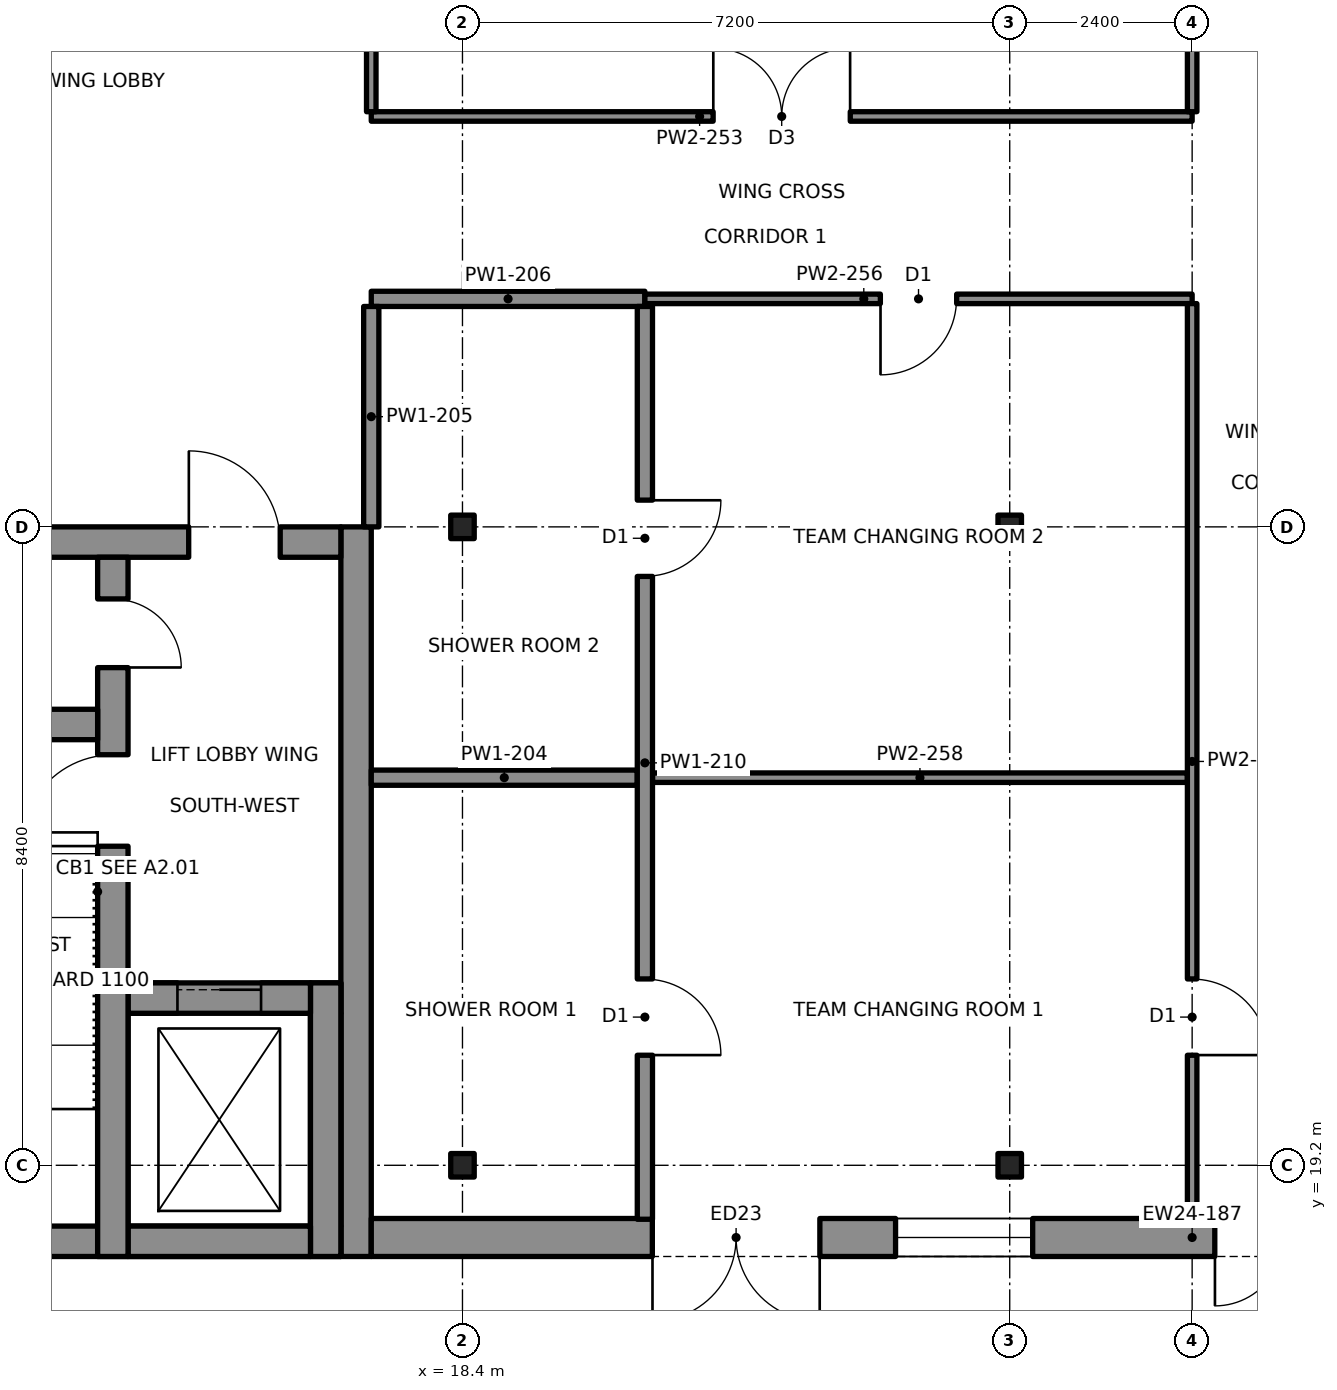
"""IFC4 building model, lengths in metres.
Left out: names, types, materials, properties, quantities, classifications, styles, units other than length and angle.
Written with IfcOpenShell. Run it as: python <this file> out.ifc"""

import sys

from ifc_helpers import new_model, si_unit, direction, frame, frame_2d, origin, origin_2d, place, context, subcontext, project, spatial, rectangle, i_section, extrude, element, fill, save


model = new_model("IFC4")
c1 = context("Model", 3, precision=1e-05, world=origin(), true_north=direction((0.0, 1.0)))
c2 = subcontext(c1, "Body", "Model", "MODEL_VIEW")
j1 = project(units=[si_unit("LENGTHUNIT", "METRE"), si_unit("PLANEANGLEUNIT", "RADIAN")], contexts=[c1])
p1 = place(None, origin())
s1 = spatial("IfcSite", under=j1, at=p1, CompositionType="ELEMENT")
p2 = place(p1, origin())
s2 = spatial("IfcBuilding", under=s1, at=p2, CompositionType="ELEMENT")
p3 = place(p2, origin())
s3 = spatial("IfcBuildingStorey", under=s2, at=p3, CompositionType="ELEMENT", Elevation=0.0)
for number, where, z_axis, x_axis in (
    (1, (18.4, 19.2, -0.9), (0.0, 0.0, 1.0), (1.0, 0.0, 0.0)),
    (2, (18.4, 27.6, -0.9), (0.0, 0.0, 1.0), (1.0, 0.0, 0.0)),
    (3, (25.6, 19.2, -0.9), (0.0, 0.0, 1.0), (1.0, 0.0, 0.0)),
    (4, (25.6, 27.6, -0.9), (0.0, 0.0, 1.0), (1.0, 0.0, 0.0)),
):
    element("IfcColumn", number, at=place(p3, frame(where, z_axis=z_axis, x_axis=x_axis)), inside=s3, PredefinedType="COLUMN", context=c2, shape_type="SweptSolid", body=[
        extrude(i_section(OverallWidth=0.309, OverallDepth=0.323, WebThickness=0.014, FlangeThickness=0.023, at=origin_2d()), origin(), (0.0, 0.0, 1.0), 5.3),
    ])
p4 = place(p3, frame((17.2, 18.25, 0.0), z_axis=(0.0, 0.0, 1.0), x_axis=(1.0, 0.0, 0.0)))
e5 = element("IfcWall", 5, at=p4, inside=s3, PredefinedType="SOLIDWALL", context=c2, shape_type="SweptSolid", body=[
    extrude(rectangle(XDim=21.6, YDim=0.5, at=frame_2d((10.8, 0.0))), origin(), (0.0, 0.0, 1.0), 4.4),
])
p5 = place(p4, frame((6.9, 0.0, 0.9)))
e6 = element("IfcOpeningElement", 6, at=p5, cuts=e5, PredefinedType="OPENING", context=c2, shape_type="SweptSolid", body=[
    extrude(rectangle(XDim=1.8, YDim=2.0, at=frame_2d((0.9, 1.0))), frame((0.0, 0.26, 0.0), z_axis=(0.0, -1.0, 0.0), x_axis=(1.0, 0.0, 0.0)), (0.0, 0.0, 1.0), 0.52),
])
p6 = place(p4, frame((15.1, 0.0, 0.9)))
e7 = element("IfcOpeningElement", 7, at=p6, cuts=e5, PredefinedType="OPENING", context=c2, shape_type="SweptSolid", body=[
    extrude(rectangle(XDim=1.8, YDim=2.0, at=frame_2d((0.9, 1.0))), frame((0.0, 0.26, 0.0), z_axis=(0.0, -1.0, 0.0), x_axis=(1.0, 0.0, 0.0)), (0.0, 0.0, 1.0), 0.52),
])
p7 = place(p4, frame((19.3, 0.0, 0.9)))
e8 = element("IfcOpeningElement", 8, at=p7, cuts=e5, PredefinedType="OPENING", context=c2, shape_type="SweptSolid", body=[
    extrude(rectangle(XDim=1.8, YDim=2.0, at=frame_2d((0.9, 1.0))), frame((0.0, 0.26, 0.0), z_axis=(0.0, -1.0, 0.0), x_axis=(1.0, 0.0, 0.0)), (0.0, 0.0, 1.0), 0.52),
])
p8 = place(p4, frame((3.7, 0.0, 0.0)))
e9 = element("IfcOpeningElement", 9, at=p8, cuts=e5, PredefinedType="OPENING", context=c2, shape_type="SweptSolid", body=[
    extrude(rectangle(XDim=2.2, YDim=2.4, at=frame_2d((1.1, 1.2))), frame((0.0, 0.26, 0.0), z_axis=(0.0, -1.0, 0.0), x_axis=(1.0, 0.0, 0.0)), (0.0, 0.0, 1.0), 0.52),
])
p9 = place(p4, frame((11.1, 0.0, 0.0)))
e10 = element("IfcOpeningElement", 10, at=p9, cuts=e5, PredefinedType="OPENING", context=c2, shape_type="SweptSolid", body=[
    extrude(rectangle(XDim=1.8, YDim=2.4, at=frame_2d((0.9, 1.2))), frame((0.0, 0.26, 0.0), z_axis=(0.0, -1.0, 0.0), x_axis=(1.0, 0.0, 0.0)), (0.0, 0.0, 1.0), 0.52),
])
p10 = place(p3, frame((17.0, 18.0, 0.0), z_axis=(0.0, 0.0, 1.0), x_axis=(0.0, 1.0, 0.0)))
e11 = element("IfcWall", 11, at=p10, inside=s3, PredefinedType="SHEAR", context=c2, shape_type="SweptSolid", body=[
    extrude(rectangle(XDim=9.6, YDim=0.4, at=frame_2d((4.8, 0.0))), origin(), (0.0, 0.0, 1.0), 4.4),
])
p11 = place(p3, frame((10.4, 18.2, 0.0), z_axis=(0.0, 0.0, 1.0), x_axis=(1.0, 0.0, 0.0)))
e12 = element("IfcWall", 12, at=p11, inside=s3, PredefinedType="SHEAR", context=c2, shape_type="SweptSolid", body=[
    extrude(rectangle(XDim=6.4, YDim=0.4, at=frame_2d((3.2, 0.0))), origin(), (0.0, 0.0, 1.0), 4.4),
])
p12 = place(p3, frame((10.4, 27.4, 0.0), z_axis=(0.0, 0.0, 1.0), x_axis=(1.0, 0.0, 0.0)))
e13 = element("IfcWall", 13, at=p12, inside=s3, PredefinedType="SHEAR", context=c2, shape_type="SweptSolid", body=[
    extrude(rectangle(XDim=6.4, YDim=0.4, at=frame_2d((3.2, 0.0))), origin(), (0.0, 0.0, 1.0), 4.4),
])
p13 = place(p12, frame((4.4, 0.0, 0.0)))
e14 = element("IfcOpeningElement", 14, at=p13, cuts=e13, PredefinedType="OPENING", context=c2, shape_type="SweptSolid", body=[
    extrude(rectangle(XDim=1.2, YDim=2.1, at=frame_2d((0.6, 1.05))), frame((0.0, 0.21, 0.0), z_axis=(0.0, -1.0, 0.0), x_axis=(1.0, 0.0, 0.0)), (0.0, 0.0, 1.0), 0.42),
])
p14 = place(p3, frame((13.8, 18.4, 0.0), z_axis=(0.0, 0.0, 1.0), x_axis=(0.0, 1.0, 0.0)))
e15 = element("IfcWall", 15, at=p14, inside=s3, PredefinedType="SHEAR", context=c2, shape_type="SweptSolid", body=[
    extrude(rectangle(XDim=8.8, YDim=0.4, at=frame_2d((4.4, 0.0))), origin(), (0.0, 0.0, 1.0), 4.4),
])
p15 = place(p14, frame((5.0, 0.0, 0.0)))
e16 = element("IfcOpeningElement", 16, at=p15, cuts=e15, PredefinedType="OPENING", context=c2, shape_type="SweptSolid", body=[
    extrude(rectangle(XDim=1.2, YDim=2.1, at=frame_2d((0.6, 1.05))), frame((0.0, 0.21, 0.0), z_axis=(0.0, -1.0, 0.0), x_axis=(1.0, 0.0, 0.0)), (0.0, 0.0, 1.0), 0.42),
])
p16 = place(p14, frame((7.35, 0.0, 0.0)))
e17 = element("IfcOpeningElement", 17, at=p16, cuts=e15, PredefinedType="OPENING", context=c2, shape_type="SweptSolid", body=[
    extrude(rectangle(XDim=0.9, YDim=2.1, at=frame_2d((0.45, 1.05))), frame((0.0, 0.21, 0.0), z_axis=(0.0, -1.0, 0.0), x_axis=(1.0, 0.0, 0.0)), (0.0, 0.0, 1.0), 0.42),
])
p17 = place(p3, frame((10.4, 25.0, 0.0), z_axis=(0.0, 0.0, 1.0), x_axis=(1.0, 0.0, 0.0)))
e18 = element("IfcWall", 18, at=p17, inside=s3, PredefinedType="SHEAR", context=c2, shape_type="SweptSolid", body=[
    extrude(rectangle(XDim=3.2, YDim=0.4, at=frame_2d((1.6, 0.0))), origin(), (0.0, 0.0, 1.0), 4.4),
])
p18 = place(p3, frame((14.0, 21.4, 0.0), z_axis=(0.0, 0.0, 1.0), x_axis=(1.0, 0.0, 0.0)))
e19 = element("IfcWall", 19, at=p18, inside=s3, PredefinedType="SHEAR", context=c2, shape_type="SweptSolid", body=[
    extrude(rectangle(XDim=2.8, YDim=0.4, at=frame_2d((1.4, 0.0))), origin(), (0.0, 0.0, 1.0), 4.4),
])
p19 = place(p18, frame((0.65, 0.0, 0.0)))
e20 = element("IfcOpeningElement", 20, at=p19, cuts=e19, PredefinedType="OPENING", context=c2, shape_type="SweptSolid", body=[
    extrude(rectangle(XDim=1.1, YDim=2.1, at=frame_2d((0.55, 1.05))), frame((0.0, 0.21, 0.0), z_axis=(0.0, -1.0, 0.0), x_axis=(1.0, 0.0, 0.0)), (0.0, 0.0, 1.0), 0.42),
])
p20 = place(p3, frame((16.6, 18.4, 0.0), z_axis=(0.0, 0.0, 1.0), x_axis=(0.0, 1.0, 0.0)))
e21 = element("IfcWall", 21, at=p20, inside=s3, PredefinedType="SHEAR", context=c2, shape_type="SweptSolid", body=[
    extrude(rectangle(XDim=2.8, YDim=0.4, at=frame_2d((1.4, 0.0))), origin(), (0.0, 0.0, 1.0), 4.4),
])
for number, where, z_axis, x_axis in (
    (22, (13.8, 18.0, -1.5), (0.0, 0.0, 1.0), (0.0, 1.0, 0.0)),
    (23, (16.6, 18.0, -1.5), (0.0, 0.0, 1.0), (0.0, 1.0, 0.0)),
):
    element("IfcWall", number, at=place(p3, frame(where, z_axis=z_axis, x_axis=x_axis)), inside=s3, PredefinedType="SHEAR", context=c2, shape_type="SweptSolid", body=[
        extrude(rectangle(XDim=3.6, YDim=0.4, at=frame_2d((1.8, 0.0))), origin(), (0.0, 0.0, 1.0), 1.5),
    ])
for number, where, z_axis, x_axis in (
    (24, (14.0, 18.2, -1.5), (0.0, 0.0, 1.0), (1.0, 0.0, 0.0)),
    (25, (14.0, 21.4, -1.5), (0.0, 0.0, 1.0), (1.0, 0.0, 0.0)),
):
    element("IfcWall", number, at=place(p3, frame(where, z_axis=z_axis, x_axis=x_axis)), inside=s3, PredefinedType="SHEAR", context=c2, shape_type="SweptSolid", body=[
        extrude(rectangle(XDim=2.4, YDim=0.4, at=frame_2d((1.2, 0.0))), origin(), (0.0, 0.0, 1.0), 1.5),
    ])
p21 = place(p3, frame((17.2, 24.3, 0.0), z_axis=(0.0, 0.0, 1.0), x_axis=(1.0, 0.0, 0.0)))
e26 = element("IfcWall", 26, at=p21, inside=s3, PredefinedType="PARTITIONING", context=c2, shape_type="SweptSolid", body=[
    extrude(rectangle(XDim=3.5, YDim=0.2, at=frame_2d((1.75, 0.0))), origin(), (0.0, 0.0, 1.0), 3.65),
])
p22 = place(p3, frame((20.9, 24.3, 0.0), z_axis=(0.0, 0.0, 1.0), x_axis=(1.0, 0.0, 0.0)))
e27 = element("IfcWall", 27, at=p22, inside=s3, PredefinedType="PARTITIONING", context=c2, shape_type="SweptSolid", body=[
    extrude(rectangle(XDim=7.038, YDim=0.125, at=frame_2d((3.519, 0.0))), origin(), (0.0, 0.0, 1.0), 3.65),
])
p23 = place(p3, frame((17.2, 30.6, 0.0), z_axis=(0.0, 0.0, 1.0), x_axis=(1.0, 0.0, 0.0)))
e28 = element("IfcWall", 28, at=p23, inside=s3, PredefinedType="PARTITIONING", context=c2, shape_type="SweptSolid", body=[
    extrude(rectangle(XDim=3.6, YDim=0.2, at=frame_2d((1.8, 0.0))), origin(), (0.0, 0.0, 1.0), 3.65),
])
p24 = place(p3, frame((20.8, 30.6, 0.0), z_axis=(0.0, 0.0, 1.0), x_axis=(1.0, 0.0, 0.0)))
e29 = element("IfcWall", 29, at=p24, inside=s3, PredefinedType="PARTITIONING", context=c2, shape_type="SweptSolid", body=[
    extrude(rectangle(XDim=7.2, YDim=0.125, at=frame_2d((3.6, 0.0))), origin(), (0.0, 0.0, 1.0), 3.65),
])
p25 = place(p24, frame((3.1, 0.0, 0.0)))
e30 = element("IfcOpeningElement", 30, at=p25, cuts=e29, PredefinedType="OPENING", context=c2, shape_type="SweptSolid", body=[
    extrude(rectangle(XDim=1.0, YDim=2.1, at=frame_2d((0.5, 1.05))), frame((0.0, 0.073, 0.0), z_axis=(0.0, -1.0, 0.0), x_axis=(1.0, 0.0, 0.0)), (0.0, 0.0, 1.0), 0.145),
])
p26 = place(p3, frame((17.2, 33.0, 0.0), z_axis=(0.0, 0.0, 1.0), x_axis=(1.0, 0.0, 0.0)))
e31 = element("IfcWall", 31, at=p26, inside=s3, PredefinedType="PARTITIONING", context=c2, shape_type="SweptSolid", body=[
    extrude(rectangle(XDim=10.8, YDim=0.125, at=frame_2d((5.4, 0.0))), origin(), (0.0, 0.0, 1.0), 3.65),
])
p27 = place(p26, frame((4.5, 0.0, 0.0)))
e32 = element("IfcOpeningElement", 32, at=p27, cuts=e31, PredefinedType="OPENING", context=c2, shape_type="SweptSolid", body=[
    extrude(rectangle(XDim=1.8, YDim=2.1, at=frame_2d((0.9, 1.05))), frame((0.0, 0.073, 0.0), z_axis=(0.0, -1.0, 0.0), x_axis=(1.0, 0.0, 0.0)), (0.0, 0.0, 1.0), 0.145),
])
p28 = place(p3, frame((17.2, 27.6, 0.0), z_axis=(0.0, 0.0, 1.0), x_axis=(0.0, 1.0, 0.0)))
e33 = element("IfcWall", 33, at=p28, inside=s3, PredefinedType="PARTITIONING", context=c2, shape_type="SweptSolid", body=[
    extrude(rectangle(XDim=2.9, YDim=0.2, at=frame_2d((1.45, 0.0))), origin(), (0.0, 0.0, 1.0), 3.65),
])
p29 = place(p3, frame((17.2, 33.062, 0.0), z_axis=(0.0, 0.0, 1.0), x_axis=(0.0, 1.0, 0.0)))
e34 = element("IfcWall", 34, at=p29, inside=s3, PredefinedType="PARTITIONING", context=c2, shape_type="SweptSolid", body=[
    extrude(rectangle(XDim=5.875, YDim=0.125, at=frame_2d((2.938, 0.0))), origin(), (0.0, 0.0, 1.0), 3.65),
])
p30 = place(p3, frame((20.8, 18.49, 0.0), z_axis=(0.0, 0.0, 1.0), x_axis=(0.0, 1.0, 0.0)))
e35 = element("IfcWall", 35, at=p30, inside=s3, PredefinedType="PARTITIONING", context=c2, shape_type="SweptSolid", body=[
    extrude(rectangle(XDim=12.01, YDim=0.2, at=frame_2d((6.005, 0.0))), origin(), (0.0, 0.0, 1.0), 3.65),
])
p31 = place(p30, frame((2.16, 0.0, 0.0)))
e36 = element("IfcOpeningElement", 36, at=p31, cuts=e35, PredefinedType="OPENING", context=c2, shape_type="SweptSolid", body=[
    extrude(rectangle(XDim=1.0, YDim=2.1, at=frame_2d((0.5, 1.05))), frame((0.0, 0.11, 0.0), z_axis=(0.0, -1.0, 0.0), x_axis=(1.0, 0.0, 0.0)), (0.0, 0.0, 1.0), 0.22),
])
p32 = place(p30, frame((8.46, 0.0, 0.0)))
e37 = element("IfcOpeningElement", 37, at=p32, cuts=e35, PredefinedType="OPENING", context=c2, shape_type="SweptSolid", body=[
    extrude(rectangle(XDim=1.0, YDim=2.1, at=frame_2d((0.5, 1.05))), frame((0.0, 0.11, 0.0), z_axis=(0.0, -1.0, 0.0), x_axis=(1.0, 0.0, 0.0)), (0.0, 0.0, 1.0), 0.22),
])
p33 = place(p3, frame((28.0, 18.49, 0.0), z_axis=(0.0, 0.0, 1.0), x_axis=(0.0, 1.0, 0.0)))
e38 = element("IfcWall", 38, at=p33, inside=s3, PredefinedType="PARTITIONING", context=c2, shape_type="SweptSolid", body=[
    extrude(rectangle(XDim=12.048, YDim=0.125, at=frame_2d((6.024, 0.0))), origin(), (0.0, 0.0, 1.0), 3.65),
])
p34 = place(p33, frame((2.16, 0.0, 0.0)))
e39 = element("IfcOpeningElement", 39, at=p34, cuts=e38, PredefinedType="OPENING", context=c2, shape_type="SweptSolid", body=[
    extrude(rectangle(XDim=1.0, YDim=2.1, at=frame_2d((0.5, 1.05))), frame((0.0, 0.073, 0.0), z_axis=(0.0, -1.0, 0.0), x_axis=(1.0, 0.0, 0.0)), (0.0, 0.0, 1.0), 0.145),
])
p35 = place(p3, frame((28.0, 33.062, 0.0), z_axis=(0.0, 0.0, 1.0), x_axis=(0.0, 1.0, 0.0)))
e40 = element("IfcWall", 40, at=p35, inside=s3, PredefinedType="PARTITIONING", context=c2, shape_type="SweptSolid", body=[
    extrude(rectangle(XDim=5.875, YDim=0.125, at=frame_2d((2.938, 0.0))), origin(), (0.0, 0.0, 1.0), 3.65),
])
p36 = place(p5, origin())
e41 = element("IfcWindow", 41, at=p36, inside=s3, PartitioningType="SINGLE_PANEL", PredefinedType="WINDOW", context=c2, shape_type="SweptSolid", body=[
    extrude(rectangle(XDim=1.8, YDim=2.0, at=frame_2d((0.9, 1.0))), frame((0.0, 0.03, 0.0), z_axis=(0.0, -1.0, 0.0), x_axis=(1.0, 0.0, 0.0)), (0.0, 0.0, 1.0), 0.06),
])
fill(e6, e41)
p37 = place(p8, origin())
e42 = element("IfcDoor", 42, at=p37, inside=s3, OperationType="DOUBLE_DOOR_SINGLE_SWING", PredefinedType="DOOR", context=c2, shape_type="SweptSolid", body=[
    extrude(rectangle(XDim=2.2, YDim=2.4, at=frame_2d((1.1, 1.2))), frame((0.0, 0.025, 0.0), z_axis=(0.0, -1.0, 0.0), x_axis=(1.0, 0.0, 0.0)), (0.0, 0.0, 1.0), 0.05),
])
fill(e9, e42)
p38 = place(p9, origin())
e43 = element("IfcDoor", 43, at=p38, inside=s3, OperationType="DOUBLE_DOOR_SINGLE_SWING", PredefinedType="DOOR", context=c2, shape_type="SweptSolid", body=[
    extrude(rectangle(XDim=1.8, YDim=2.4, at=frame_2d((0.9, 1.2))), frame((0.0, 0.025, 0.0), z_axis=(0.0, -1.0, 0.0), x_axis=(1.0, 0.0, 0.0)), (0.0, 0.0, 1.0), 0.05),
])
fill(e10, e43)
p39 = place(p13, origin())
e44 = element("IfcDoor", 44, at=p39, inside=s3, OperationType="SINGLE_SWING_LEFT", PredefinedType="DOOR", context=c2, shape_type="SweptSolid", body=[
    extrude(rectangle(XDim=1.2, YDim=2.1, at=frame_2d((0.6, 1.05))), frame((0.0, 0.025, 0.0), z_axis=(0.0, -1.0, 0.0), x_axis=(1.0, 0.0, 0.0)), (0.0, 0.0, 1.0), 0.05),
])
fill(e14, e44)
p40 = place(p15, origin())
e45 = element("IfcDoor", 45, at=p40, inside=s3, OperationType="SINGLE_SWING_LEFT", PredefinedType="DOOR", context=c2, shape_type="SweptSolid", body=[
    extrude(rectangle(XDim=1.2, YDim=2.1, at=frame_2d((0.6, 1.05))), frame((0.0, 0.025, 0.0), z_axis=(0.0, -1.0, 0.0), x_axis=(1.0, 0.0, 0.0)), (0.0, 0.0, 1.0), 0.05),
])
fill(e16, e45)
p41 = place(p16, origin())
e46 = element("IfcDoor", 46, at=p41, inside=s3, OperationType="SINGLE_SWING_LEFT", PredefinedType="DOOR", context=c2, shape_type="SweptSolid", body=[
    extrude(rectangle(XDim=0.9, YDim=2.1, at=frame_2d((0.45, 1.05))), frame((0.0, 0.025, 0.0), z_axis=(0.0, -1.0, 0.0), x_axis=(1.0, 0.0, 0.0)), (0.0, 0.0, 1.0), 0.05),
])
fill(e17, e46)
p42 = place(p19, origin())
e47 = element("IfcDoor", 47, at=p42, inside=s3, OperationType="SLIDING_TO_LEFT", PredefinedType="DOOR", context=c2, shape_type="SweptSolid", body=[
    extrude(rectangle(XDim=1.1, YDim=2.1, at=frame_2d((0.55, 1.05))), frame((0.0, 0.025, 0.0), z_axis=(0.0, -1.0, 0.0), x_axis=(1.0, 0.0, 0.0)), (0.0, 0.0, 1.0), 0.05),
])
fill(e20, e47)
p43 = place(p34, origin())
e48 = element("IfcDoor", 48, at=p43, inside=s3, OperationType="SINGLE_SWING_LEFT", PredefinedType="DOOR", context=c2, shape_type="SweptSolid", body=[
    extrude(rectangle(XDim=1.0, YDim=2.1, at=frame_2d((0.5, 1.05))), frame((0.0, 0.025, 0.0), z_axis=(0.0, -1.0, 0.0), x_axis=(1.0, 0.0, 0.0)), (0.0, 0.0, 1.0), 0.05),
])
fill(e39, e48)
p44 = place(p31, origin())
e49 = element("IfcDoor", 49, at=p44, inside=s3, OperationType="SINGLE_SWING_LEFT", PredefinedType="DOOR", context=c2, shape_type="SweptSolid", body=[
    extrude(rectangle(XDim=1.0, YDim=2.1, at=frame_2d((0.5, 1.05))), frame((0.0, 0.025, 0.0), z_axis=(0.0, -1.0, 0.0), x_axis=(1.0, 0.0, 0.0)), (0.0, 0.0, 1.0), 0.05),
])
fill(e36, e49)
p45 = place(p25, origin())
e50 = element("IfcDoor", 50, at=p45, inside=s3, OperationType="SINGLE_SWING_LEFT", PredefinedType="DOOR", context=c2, shape_type="SweptSolid", body=[
    extrude(rectangle(XDim=1.0, YDim=2.1, at=frame_2d((0.5, 1.05))), frame((0.0, 0.025, 0.0), z_axis=(0.0, -1.0, 0.0), x_axis=(1.0, 0.0, 0.0)), (0.0, 0.0, 1.0), 0.05),
])
fill(e30, e50)
p46 = place(p32, origin())
e51 = element("IfcDoor", 51, at=p46, inside=s3, OperationType="SINGLE_SWING_RIGHT", PredefinedType="DOOR", context=c2, shape_type="SweptSolid", body=[
    extrude(rectangle(XDim=1.0, YDim=2.1, at=frame_2d((0.5, 1.05))), frame((0.0, 0.025, 0.0), z_axis=(0.0, -1.0, 0.0), x_axis=(1.0, 0.0, 0.0)), (0.0, 0.0, 1.0), 0.05),
])
fill(e37, e51)
p47 = place(p27, origin())
e52 = element("IfcDoor", 52, at=p47, inside=s3, OperationType="DOUBLE_DOOR_SINGLE_SWING", PredefinedType="DOOR", context=c2, shape_type="SweptSolid", body=[
    extrude(rectangle(XDim=1.8, YDim=2.1, at=frame_2d((0.9, 1.05))), frame((0.0, 0.025, 0.0), z_axis=(0.0, -1.0, 0.0), x_axis=(1.0, 0.0, 0.0)), (0.0, 0.0, 1.0), 0.05),
])
fill(e32, e52)
save(model, sys.argv[1])
